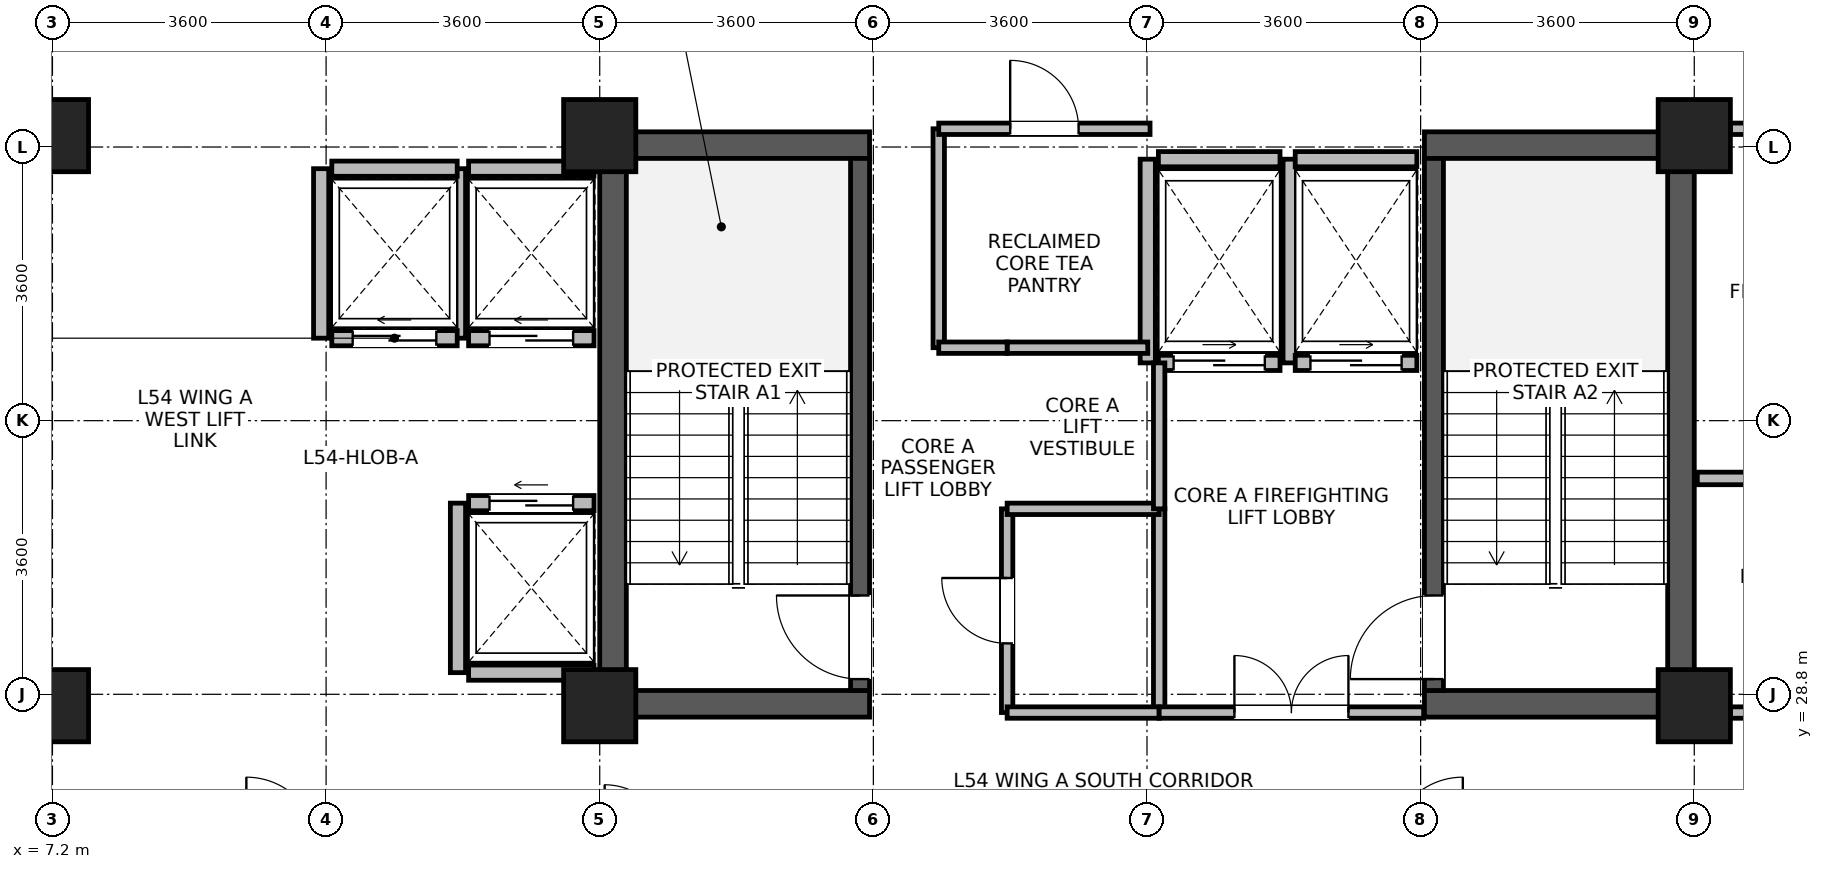
"""IFC4 building model, lengths in metres.
Left out: names, types, materials, properties, quantities, classifications, styles, units other than length and angle.
Written with IfcOpenShell. Run it as: python <this file> out.ifc"""

import sys

from ifc_helpers import new_model, si_unit, direction, frame, frame_2d, origin, origin_2d, place, context, subcontext, project, spatial, rectangle, extrude, source, transform, mapped, element, fill, save


model = new_model("IFC4")
c1 = context("Model", 3, precision=1e-05, world=origin(), true_north=direction((0.0, 1.0)))
c2 = subcontext(c1, "Body", "Model", "MODEL_VIEW")
j1 = project(units=[si_unit("LENGTHUNIT", "METRE"), si_unit("PLANEANGLEUNIT", "RADIAN")], contexts=[c1])
p1 = place(None, origin())
s1 = spatial("IfcSite", under=j1, at=p1, CompositionType="ELEMENT")
p2 = place(p1, origin())
s2 = spatial("IfcBuilding", under=s1, at=p2, CompositionType="ELEMENT")
p3 = place(p2, frame((0.0, 0.0, 212.9)))
s3 = spatial("IfcBuildingStorey", under=s2, at=p3, CompositionType="ELEMENT", Elevation=212.9)
for number, where, z_axis, x_axis in (
    (1, (14.575, 28.5, 0.0), (0.0, 0.0, 1.0), (0.0, 1.0, 0.0)),
    (2, (28.625, 28.5, 0.0), (0.0, 0.0, 1.0), (0.0, 1.0, 0.0)),
):
    element("IfcWall", number, at=place(p3, frame(where, z_axis=z_axis, x_axis=x_axis)), inside=s3, PredefinedType="SHEAR", context=c2, shape_type="SweptSolid", body=[
        extrude(rectangle(XDim=7.7, YDim=0.35, at=frame_2d((3.85, 0.0))), origin(), (0.0, 0.0, 1.0), 3.47),
    ])
for number, where, z_axis, x_axis in (
    (3, (14.75, 28.675, 0.0), (0.0, 0.0, 1.0), (1.0, 0.0, 0.0)),
    (4, (25.25, 28.675, 0.0), (0.0, 0.0, 1.0), (1.0, 0.0, 0.0)),
    (5, (14.75, 36.025, 0.0), (0.0, 0.0, 1.0), (1.0, 0.0, 0.0)),
    (6, (25.25, 36.025, 0.0), (0.0, 0.0, 1.0), (1.0, 0.0, 0.0)),
):
    element("IfcWall", number, at=place(p3, frame(where, z_axis=z_axis, x_axis=x_axis)), inside=s3, PredefinedType="SHEAR", context=c2, shape_type="SweptSolid", body=[
        extrude(rectangle(XDim=3.2, YDim=0.35, at=frame_2d((1.6, 0.0))), origin(), (0.0, 0.0, 1.0), 3.47),
    ])
p4 = place(p3, frame((17.825, 28.85, 0.0), z_axis=(0.0, 0.0, 1.0), x_axis=(0.0, 1.0, 0.0)))
e7 = element("IfcWall", 7, at=p4, inside=s3, PredefinedType="SHEAR", context=c2, shape_type="SweptSolid", body=[
    extrude(rectangle(XDim=7.0, YDim=0.25, at=frame_2d((3.5, 0.0))), origin(), (0.0, 0.0, 1.0), 3.47),
])
p5 = place(p4, frame((0.15, 0.0, 0.0)))
e8 = element("IfcOpeningElement", 8, at=p5, cuts=e7, PredefinedType="OPENING", context=c2, shape_type="SweptSolid", body=[
    extrude(rectangle(XDim=1.1, YDim=2.08, at=frame_2d((0.55, 1.04))), frame((0.0, 0.135, 0.0), z_axis=(0.0, -1.0, 0.0), x_axis=(1.0, 0.0, 0.0)), (0.0, 0.0, 1.0), 0.27),
])
p6 = place(p3, frame((25.375, 28.85, 0.0), z_axis=(0.0, 0.0, 1.0), x_axis=(0.0, 1.0, 0.0)))
e9 = element("IfcWall", 9, at=p6, inside=s3, PredefinedType="SHEAR", context=c2, shape_type="SweptSolid", body=[
    extrude(rectangle(XDim=7.0, YDim=0.25, at=frame_2d((3.5, 0.0))), origin(), (0.0, 0.0, 1.0), 3.47),
])
p7 = place(p6, frame((0.15, 0.0, 0.0)))
e10 = element("IfcOpeningElement", 10, at=p7, cuts=e9, PredefinedType="OPENING", context=c2, shape_type="SweptSolid", body=[
    extrude(rectangle(XDim=1.1, YDim=2.08, at=frame_2d((0.55, 1.04))), frame((0.0, 0.135, 0.0), z_axis=(0.0, -1.0, 0.0), x_axis=(1.0, 0.0, 0.0)), (0.0, 0.0, 1.0), 0.27),
])
m1 = source(origin(), c2, "Body", "SweptSolid", [
    extrude(rectangle(XDim=0.95, YDim=0.95, at=origin_2d()), origin(), (0.0, 0.0, 1.0), 3.7),
])
for number, where, z_axis, x_axis in (
    (11, (7.2, 28.65, 0.0), (0.0, 0.0, 1.0), (1.0, 0.0, 0.0)),
    (12, (7.2, 36.15, 0.0), (0.0, 0.0, 1.0), (1.0, 0.0, 0.0)),
    (13, (14.4, 28.65, 0.0), (0.0, 0.0, 1.0), (1.0, 0.0, 0.0)),
    (14, (14.4, 36.15, 0.0), (0.0, 0.0, 1.0), (1.0, 0.0, 0.0)),
    (15, (28.8, 28.65, 0.0), (0.0, 0.0, 1.0), (1.0, 0.0, 0.0)),
    (16, (28.8, 36.15, 0.0), (0.0, 0.0, 1.0), (1.0, 0.0, 0.0)),
):
    element("IfcColumn", number, at=place(p3, frame(where, z_axis=z_axis, x_axis=x_axis)), inside=s3, PredefinedType="COLUMN", context=c2, shape_type="MappedRepresentation", body=[
        mapped(m1, transform((0.0, 0.0, 0.0), x_axis=(1.0, 0.0, 0.0), y_axis=(0.0, 1.0, 0.0), z_axis=(0.0, 0.0, 1.0), scale=1.0)),
    ])
p8 = place(p3, frame((12.675, 33.485, 0.0), z_axis=(0.0, 0.0, 1.0), x_axis=(1.0, 0.0, 0.0)))
e17 = element("IfcWall", 17, at=p8, inside=s3, PredefinedType="PARTITIONING", context=c2, shape_type="SweptSolid", body=[
    extrude(rectangle(XDim=1.65, YDim=0.2, at=frame_2d((0.825, 0.0))), origin(), (0.0, 0.0, 1.0), 3.45),
])
p9 = place(p8, frame((0.275, 0.0, 0.0)))
e18 = element("IfcOpeningElement", 18, at=p9, cuts=e17, PredefinedType="OPENING", context=c2, shape_type="SweptSolid", body=[
    extrude(rectangle(XDim=1.1, YDim=2.12, at=frame_2d((0.55, 1.06))), frame((0.0, 0.11, 0.0), z_axis=(0.0, -1.0, 0.0), x_axis=(1.0, 0.0, 0.0)), (0.0, 0.0, 1.0), 0.22),
])
p10 = place(p3, frame((12.675, 35.715, 0.0), z_axis=(0.0, 0.0, 1.0), x_axis=(1.0, 0.0, 0.0)))
e19 = element("IfcWall", 19, at=p10, inside=s3, PredefinedType="PARTITIONING", context=c2, shape_type="SweptSolid", body=[
    extrude(rectangle(XDim=1.65, YDim=0.2, at=frame_2d((0.825, 0.0))), origin(), (0.0, 0.0, 1.0), 3.45),
])
p11 = place(p3, frame((12.535, 33.485, 0.0), z_axis=(0.0, 0.0, 1.0), x_axis=(0.0, 1.0, 0.0)))
e20 = element("IfcWall", 20, at=p11, inside=s3, PredefinedType="PARTITIONING", context=c2, shape_type="SweptSolid", body=[
    extrude(rectangle(XDim=2.23, YDim=0.2, at=frame_2d((1.115, 0.0))), origin(), (0.0, 0.0, 1.0), 3.45),
])
p12 = place(p3, frame((12.675, 29.085, 0.0), z_axis=(0.0, 0.0, 1.0), x_axis=(1.0, 0.0, 0.0)))
e21 = element("IfcWall", 21, at=p12, inside=s3, PredefinedType="PARTITIONING", context=c2, shape_type="SweptSolid", body=[
    extrude(rectangle(XDim=1.65, YDim=0.2, at=frame_2d((0.825, 0.0))), origin(), (0.0, 0.0, 1.0), 3.45),
])
p13 = place(p3, frame((12.675, 31.315, 0.0), z_axis=(0.0, 0.0, 1.0), x_axis=(1.0, 0.0, 0.0)))
e22 = element("IfcWall", 22, at=p13, inside=s3, PredefinedType="PARTITIONING", context=c2, shape_type="SweptSolid", body=[
    extrude(rectangle(XDim=1.65, YDim=0.2, at=frame_2d((0.825, 0.0))), origin(), (0.0, 0.0, 1.0), 3.45),
])
p14 = place(p13, frame((0.275, 0.0, 0.0)))
e23 = element("IfcOpeningElement", 23, at=p14, cuts=e22, PredefinedType="OPENING", context=c2, shape_type="SweptSolid", body=[
    extrude(rectangle(XDim=1.1, YDim=2.12, at=frame_2d((0.55, 1.06))), frame((0.0, 0.11, 0.0), z_axis=(0.0, -1.0, 0.0), x_axis=(1.0, 0.0, 0.0)), (0.0, 0.0, 1.0), 0.22),
])
p15 = place(p3, frame((12.535, 29.085, 0.0), z_axis=(0.0, 0.0, 1.0), x_axis=(0.0, 1.0, 0.0)))
e24 = element("IfcWall", 24, at=p15, inside=s3, PredefinedType="PARTITIONING", context=c2, shape_type="SweptSolid", body=[
    extrude(rectangle(XDim=2.23, YDim=0.2, at=frame_2d((1.115, 0.0))), origin(), (0.0, 0.0, 1.0), 3.45),
])
p16 = place(p3, frame((10.875, 33.485, 0.0), z_axis=(0.0, 0.0, 1.0), x_axis=(1.0, 0.0, 0.0)))
e25 = element("IfcWall", 25, at=p16, inside=s3, PredefinedType="PARTITIONING", context=c2, shape_type="SweptSolid", body=[
    extrude(rectangle(XDim=1.65, YDim=0.2, at=frame_2d((0.825, 0.0))), origin(), (0.0, 0.0, 1.0), 3.45),
])
p17 = place(p16, frame((0.275, 0.0, 0.0)))
e26 = element("IfcOpeningElement", 26, at=p17, cuts=e25, PredefinedType="OPENING", context=c2, shape_type="SweptSolid", body=[
    extrude(rectangle(XDim=1.1, YDim=2.12, at=frame_2d((0.55, 1.06))), frame((0.0, 0.11, 0.0), z_axis=(0.0, -1.0, 0.0), x_axis=(1.0, 0.0, 0.0)), (0.0, 0.0, 1.0), 0.22),
])
p18 = place(p3, frame((10.875, 35.715, 0.0), z_axis=(0.0, 0.0, 1.0), x_axis=(1.0, 0.0, 0.0)))
e27 = element("IfcWall", 27, at=p18, inside=s3, PredefinedType="PARTITIONING", context=c2, shape_type="SweptSolid", body=[
    extrude(rectangle(XDim=1.65, YDim=0.2, at=frame_2d((0.825, 0.0))), origin(), (0.0, 0.0, 1.0), 3.45),
])
p19 = place(p3, frame((10.735, 33.485, 0.0), z_axis=(0.0, 0.0, 1.0), x_axis=(0.0, 1.0, 0.0)))
e28 = element("IfcWall", 28, at=p19, inside=s3, PredefinedType="PARTITIONING", context=c2, shape_type="SweptSolid", body=[
    extrude(rectangle(XDim=2.23, YDim=0.2, at=frame_2d((1.115, 0.0))), origin(), (0.0, 0.0, 1.0), 3.45),
])
p20 = place(p3, frame((21.75, 33.16, 0.0), z_axis=(0.0, 0.0, 1.0), x_axis=(1.0, 0.0, 0.0)))
e29 = element("IfcWall", 29, at=p20, inside=s3, PredefinedType="PARTITIONING", context=c2, shape_type="SweptSolid", body=[
    extrude(rectangle(XDim=1.6, YDim=0.2, at=frame_2d((0.8, 0.0))), origin(), (0.0, 0.0, 1.0), 3.45),
])
p21 = place(p20, frame((0.2, 0.0, 0.0)))
e30 = element("IfcOpeningElement", 30, at=p21, cuts=e29, PredefinedType="OPENING", context=c2, shape_type="SweptSolid", body=[
    extrude(rectangle(XDim=1.2, YDim=2.12, at=frame_2d((0.6, 1.06))), frame((0.0, 0.11, 0.0), z_axis=(0.0, -1.0, 0.0), x_axis=(1.0, 0.0, 0.0)), (0.0, 0.0, 1.0), 0.22),
])
p22 = place(p3, frame((21.75, 35.84, 0.0), z_axis=(0.0, 0.0, 1.0), x_axis=(1.0, 0.0, 0.0)))
e31 = element("IfcWall", 31, at=p22, inside=s3, PredefinedType="PARTITIONING", context=c2, shape_type="SweptSolid", body=[
    extrude(rectangle(XDim=1.6, YDim=0.2, at=frame_2d((0.8, 0.0))), origin(), (0.0, 0.0, 1.0), 2.55),
])
for number, where, z_axis, x_axis in (
    (32, (21.61, 33.16, 0.0), (0.0, 0.0, 1.0), (0.0, 1.0, 0.0)),
    (33, (23.49, 33.16, 0.0), (0.0, 0.0, 1.0), (0.0, 1.0, 0.0)),
):
    element("IfcWall", number, at=place(p3, frame(where, z_axis=z_axis, x_axis=x_axis)), inside=s3, PredefinedType="PARTITIONING", context=c2, shape_type="SweptSolid", body=[
        extrude(rectangle(XDim=2.68, YDim=0.2, at=frame_2d((1.34, 0.0))), origin(), (0.0, 0.0, 1.0), 3.45),
    ])
p23 = place(p3, frame((23.55, 33.16, 0.0), z_axis=(0.0, 0.0, 1.0), x_axis=(1.0, 0.0, 0.0)))
e34 = element("IfcWall", 34, at=p23, inside=s3, PredefinedType="PARTITIONING", context=c2, shape_type="SweptSolid", body=[
    extrude(rectangle(XDim=1.6, YDim=0.2, at=frame_2d((0.8, 0.0))), origin(), (0.0, 0.0, 1.0), 3.45),
])
p24 = place(p23, frame((0.2, 0.0, 0.0)))
e35 = element("IfcOpeningElement", 35, at=p24, cuts=e34, PredefinedType="OPENING", context=c2, shape_type="SweptSolid", body=[
    extrude(rectangle(XDim=1.2, YDim=2.12, at=frame_2d((0.6, 1.06))), frame((0.0, 0.11, 0.0), z_axis=(0.0, -1.0, 0.0), x_axis=(1.0, 0.0, 0.0)), (0.0, 0.0, 1.0), 0.22),
])
p25 = place(p3, frame((23.55, 35.84, 0.0), z_axis=(0.0, 0.0, 1.0), x_axis=(1.0, 0.0, 0.0)))
e36 = element("IfcWall", 36, at=p25, inside=s3, PredefinedType="PARTITIONING", context=c2, shape_type="SweptSolid", body=[
    extrude(rectangle(XDim=1.6, YDim=0.2, at=frame_2d((0.8, 0.0))), origin(), (0.0, 0.0, 1.0), 2.55),
])
p26 = place(p3, frame((29.275, 28.56, 0.0), z_axis=(0.0, 0.0, 1.0), x_axis=(1.0, 0.0, 0.0)))
e37 = element("IfcWall", 37, at=p26, inside=s3, PredefinedType="PARTITIONING", context=c2, shape_type="SweptSolid", body=[
    extrude(rectangle(XDim=4.085, YDim=0.15, at=frame_2d((2.042, 0.0))), origin(), (0.0, 0.0, 1.0), 2.9),
])
p27 = place(p26, frame((1.613, 0.0, 0.0)))
e38 = element("IfcOpeningElement", 38, at=p27, cuts=e37, PredefinedType="OPENING", context=c2, shape_type="SweptSolid", body=[
    extrude(rectangle(XDim=0.86, YDim=2.02, at=frame_2d((0.43, 1.01))), frame((0.0, 0.085, 0.0), z_axis=(0.0, -1.0, 0.0), x_axis=(1.0, 0.0, 0.0)), (0.0, 0.0, 1.0), 0.17),
])
p28 = place(p3, frame((29.275, 36.24, 0.0), z_axis=(0.0, 0.0, 1.0), x_axis=(1.0, 0.0, 0.0)))
e39 = element("IfcWall", 39, at=p28, inside=s3, PredefinedType="PARTITIONING", context=c2, shape_type="SweptSolid", body=[
    extrude(rectangle(XDim=4.085, YDim=0.15, at=frame_2d((2.042, 0.0))), origin(), (0.0, 0.0, 1.0), 2.9),
])
p29 = place(p3, frame((18.86, 33.36, 0.0), z_axis=(0.0, 0.0, 1.0), x_axis=(0.0, 1.0, 0.0)))
e40 = element("IfcWall", 40, at=p29, inside=s3, PredefinedType="PARTITIONING", context=c2, shape_type="SweptSolid", body=[
    extrude(rectangle(XDim=2.88, YDim=0.15, at=frame_2d((1.44, 0.0))), origin(), (0.0, 0.0, 1.0), 3.45),
])
p30 = place(p3, frame((18.86, 36.24, 0.0), z_axis=(0.0, 0.0, 1.0), x_axis=(1.0, 0.0, 0.0)))
e41 = element("IfcWall", 41, at=p30, inside=s3, PredefinedType="PARTITIONING", context=c2, shape_type="SweptSolid", body=[
    extrude(rectangle(XDim=2.78, YDim=0.15, at=frame_2d((1.39, 0.0))), origin(), (0.0, 0.0, 1.0), 2.55),
])
p31 = place(p30, frame((0.94, 0.0, 0.0)))
e42 = element("IfcOpeningElement", 42, at=p31, cuts=e41, PredefinedType="OPENING", context=c2, shape_type="SweptSolid", body=[
    extrude(rectangle(XDim=0.9, YDim=2.08, at=frame_2d((0.45, 1.04))), frame((0.0, 0.085, 0.0), z_axis=(0.0, -1.0, 0.0), x_axis=(1.0, 0.0, 0.0)), (0.0, 0.0, 1.0), 0.17),
])
p32 = place(p3, frame((19.76, 28.56, 0.0), z_axis=(0.0, 0.0, 1.0), x_axis=(0.0, 1.0, 0.0)))
e43 = element("IfcWall", 43, at=p32, inside=s3, PredefinedType="PARTITIONING", context=c2, shape_type="SweptSolid", body=[
    extrude(rectangle(XDim=2.68, YDim=0.15, at=frame_2d((1.34, 0.0))), origin(), (0.0, 0.0, 1.0), 3.45),
])
p33 = place(p32, frame((0.91, 0.0, 0.0)))
e44 = element("IfcOpeningElement", 44, at=p33, cuts=e43, PredefinedType="OPENING", context=c2, shape_type="SweptSolid", body=[
    extrude(rectangle(XDim=0.86, YDim=2.02, at=frame_2d((0.43, 1.01))), frame((0.0, 0.085, 0.0), z_axis=(0.0, -1.0, 0.0), x_axis=(1.0, 0.0, 0.0)), (0.0, 0.0, 1.0), 0.17),
])
p34 = place(p3, frame((21.76, 28.56, 0.0), z_axis=(0.0, 0.0, 1.0), x_axis=(0.0, 1.0, 0.0)))
e45 = element("IfcWall", 45, at=p34, inside=s3, PredefinedType="PARTITIONING", context=c2, shape_type="SweptSolid", body=[
    extrude(rectangle(XDim=2.68, YDim=0.15, at=frame_2d((1.34, 0.0))), origin(), (0.0, 0.0, 1.0), 3.45),
])
p35 = place(p3, frame((19.76, 28.56, 0.0), z_axis=(0.0, 0.0, 1.0), x_axis=(1.0, 0.0, 0.0)))
e46 = element("IfcWall", 46, at=p35, inside=s3, PredefinedType="PARTITIONING", context=c2, shape_type="SweptSolid", body=[
    extrude(rectangle(XDim=2.0, YDim=0.15, at=frame_2d((1.0, 0.0))), origin(), (0.0, 0.0, 1.0), 2.55),
])
p36 = place(p3, frame((19.76, 31.24, 0.0), z_axis=(0.0, 0.0, 1.0), x_axis=(1.0, 0.0, 0.0)))
e47 = element("IfcWall", 47, at=p36, inside=s3, PredefinedType="PARTITIONING", context=c2, shape_type="SweptSolid", body=[
    extrude(rectangle(XDim=2.0, YDim=0.15, at=frame_2d((1.0, 0.0))), origin(), (0.0, 0.0, 1.0), 3.45),
])
p37 = place(p3, frame((19.76, 33.36, 0.0), z_axis=(0.0, 0.0, 1.0), x_axis=(1.0, 0.0, 0.0)))
e48 = element("IfcWall", 48, at=p37, inside=s3, PredefinedType="PARTITIONING", context=c2, shape_type="SweptSolid", body=[
    extrude(rectangle(XDim=1.85, YDim=0.15, at=frame_2d((0.925, 0.0))), origin(), (0.0, 0.0, 1.0), 3.45),
])
p38 = place(p3, frame((18.86, 33.36, 0.0), z_axis=(0.0, 0.0, 1.0), x_axis=(1.0, 0.0, 0.0)))
e49 = element("IfcWall", 49, at=p38, inside=s3, PredefinedType="PARTITIONING", context=c2, shape_type="SweptSolid", body=[
    extrude(rectangle(XDim=0.9, YDim=0.15, at=frame_2d((0.45, 0.0))), origin(), (0.0, 0.0, 1.0), 3.45),
])
p39 = place(p3, frame((28.84, 31.64, 0.0), z_axis=(0.0, 0.0, 1.0), x_axis=(1.0, 0.0, 0.0)))
e50 = element("IfcWall", 50, at=p39, inside=s3, PredefinedType="PARTITIONING", context=c2, shape_type="SweptSolid", body=[
    extrude(rectangle(XDim=4.52, YDim=0.165, at=frame_2d((2.26, 0.0))), origin(), (0.0, 0.0, 1.0), 3.45),
])
p40 = place(p3, frame((21.76, 28.56, 0.0), z_axis=(0.0, 0.0, 1.0), x_axis=(1.0, 0.0, 0.0)))
e51 = element("IfcWall", 51, at=p40, inside=s3, PredefinedType="PARTITIONING", context=c2, shape_type="SweptSolid", body=[
    extrude(rectangle(XDim=3.48, YDim=0.15, at=frame_2d((1.74, 0.0))), origin(), (0.0, 0.0, 1.0), 2.55),
])
p41 = place(p40, frame((0.99, 0.0, 0.0)))
e52 = element("IfcOpeningElement", 52, at=p41, cuts=e51, PredefinedType="OPENING", context=c2, shape_type="SweptSolid", body=[
    extrude(rectangle(XDim=1.5, YDim=2.1, at=frame_2d((0.75, 1.05))), frame((0.0, 0.085, 0.0), z_axis=(0.0, -1.0, 0.0), x_axis=(1.0, 0.0, 0.0)), (0.0, 0.0, 1.0), 0.17),
])
p42 = place(p3, frame((21.76, 31.24, 0.0), z_axis=(0.0, 0.0, 1.0), x_axis=(0.0, 1.0, 0.0)))
e53 = element("IfcWall", 53, at=p42, inside=s3, PredefinedType="PARTITIONING", context=c2, shape_type="SweptSolid", body=[
    extrude(rectangle(XDim=1.92, YDim=0.15, at=frame_2d((0.96, 0.0))), origin(), (0.0, 0.0, 1.0), 3.45),
])
p43 = place(p5, origin())
e54 = element("IfcDoor", 54, at=p43, inside=s3, OperationType="SINGLE_SWING_RIGHT", PredefinedType="DOOR", context=c2, shape_type="SweptSolid", body=[
    extrude(rectangle(XDim=1.1, YDim=2.08, at=frame_2d((0.55, 1.04))), frame((0.0, 0.025, 0.0), z_axis=(0.0, -1.0, 0.0), x_axis=(1.0, 0.0, 0.0)), (0.0, 0.0, 1.0), 0.05),
])
fill(e8, e54)
p44 = place(p7, origin())
e55 = element("IfcDoor", 55, at=p44, inside=s3, OperationType="SINGLE_SWING_LEFT", PredefinedType="DOOR", context=c2, shape_type="SweptSolid", body=[
    extrude(rectangle(XDim=1.1, YDim=2.08, at=frame_2d((0.55, 1.04))), frame((0.0, 0.025, 0.0), z_axis=(0.0, -1.0, 0.0), x_axis=(1.0, 0.0, 0.0)), (0.0, 0.0, 1.0), 0.05),
])
fill(e10, e55)
p45 = place(p9, origin())
e56 = element("IfcDoor", 56, at=p45, inside=s3, OperationType="SLIDING_TO_LEFT", PredefinedType="DOOR", context=c2, shape_type="SweptSolid", body=[
    extrude(rectangle(XDim=1.1, YDim=2.12, at=frame_2d((0.55, 1.06))), frame((0.0, 0.025, 0.0), z_axis=(0.0, -1.0, 0.0), x_axis=(1.0, 0.0, 0.0)), (0.0, 0.0, 1.0), 0.05),
])
fill(e18, e56)
p46 = place(p14, origin())
e57 = element("IfcDoor", 57, at=p46, inside=s3, OperationType="SLIDING_TO_LEFT", PredefinedType="DOOR", context=c2, shape_type="SweptSolid", body=[
    extrude(rectangle(XDim=1.1, YDim=2.12, at=frame_2d((0.55, 1.06))), frame((0.0, 0.025, 0.0), z_axis=(0.0, -1.0, 0.0), x_axis=(1.0, 0.0, 0.0)), (0.0, 0.0, 1.0), 0.05),
])
fill(e23, e57)
p47 = place(p17, origin())
e58 = element("IfcDoor", 58, at=p47, inside=s3, OperationType="SLIDING_TO_LEFT", PredefinedType="DOOR", context=c2, shape_type="SweptSolid", body=[
    extrude(rectangle(XDim=1.1, YDim=2.12, at=frame_2d((0.55, 1.06))), frame((0.0, 0.025, 0.0), z_axis=(0.0, -1.0, 0.0), x_axis=(1.0, 0.0, 0.0)), (0.0, 0.0, 1.0), 0.05),
])
fill(e26, e58)
p48 = place(p21, origin())
e59 = element("IfcDoor", 59, at=p48, inside=s3, OperationType="SLIDING_TO_RIGHT", PredefinedType="DOOR", context=c2, shape_type="SweptSolid", body=[
    extrude(rectangle(XDim=1.2, YDim=2.12, at=frame_2d((0.6, 1.06))), frame((0.0, 0.025, 0.0), z_axis=(0.0, -1.0, 0.0), x_axis=(1.0, 0.0, 0.0)), (0.0, 0.0, 1.0), 0.05),
])
fill(e30, e59)
p49 = place(p24, origin())
e60 = element("IfcDoor", 60, at=p49, inside=s3, OperationType="SLIDING_TO_RIGHT", PredefinedType="DOOR", context=c2, shape_type="SweptSolid", body=[
    extrude(rectangle(XDim=1.2, YDim=2.12, at=frame_2d((0.6, 1.06))), frame((0.0, 0.025, 0.0), z_axis=(0.0, -1.0, 0.0), x_axis=(1.0, 0.0, 0.0)), (0.0, 0.0, 1.0), 0.05),
])
fill(e35, e60)
p50 = place(p31, origin())
e61 = element("IfcDoor", 61, at=p50, inside=s3, OperationType="SINGLE_SWING_LEFT", PredefinedType="DOOR", context=c2, shape_type="SweptSolid", body=[
    extrude(rectangle(XDim=0.9, YDim=2.08, at=frame_2d((0.45, 1.04))), frame((0.0, 0.025, 0.0), z_axis=(0.0, -1.0, 0.0), x_axis=(1.0, 0.0, 0.0)), (0.0, 0.0, 1.0), 0.05),
])
fill(e42, e61)
p51 = place(p33, origin())
e62 = element("IfcDoor", 62, at=p51, inside=s3, OperationType="SINGLE_SWING_RIGHT", PredefinedType="DOOR", context=c2, shape_type="SweptSolid", body=[
    extrude(rectangle(XDim=0.86, YDim=2.02, at=frame_2d((0.43, 1.01))), frame((0.0, 0.025, 0.0), z_axis=(0.0, -1.0, 0.0), x_axis=(1.0, 0.0, 0.0)), (0.0, 0.0, 1.0), 0.05),
])
fill(e44, e62)
p52 = place(p41, origin())
e63 = element("IfcDoor", 63, at=p52, inside=s3, OperationType="DOUBLE_DOOR_SINGLE_SWING", PredefinedType="DOOR", context=c2, shape_type="SweptSolid", body=[
    extrude(rectangle(XDim=1.5, YDim=2.1, at=frame_2d((0.75, 1.05))), frame((0.0, 0.025, 0.0), z_axis=(0.0, -1.0, 0.0), x_axis=(1.0, 0.0, 0.0)), (0.0, 0.0, 1.0), 0.05),
])
fill(e52, e63)
save(model, sys.argv[1])
